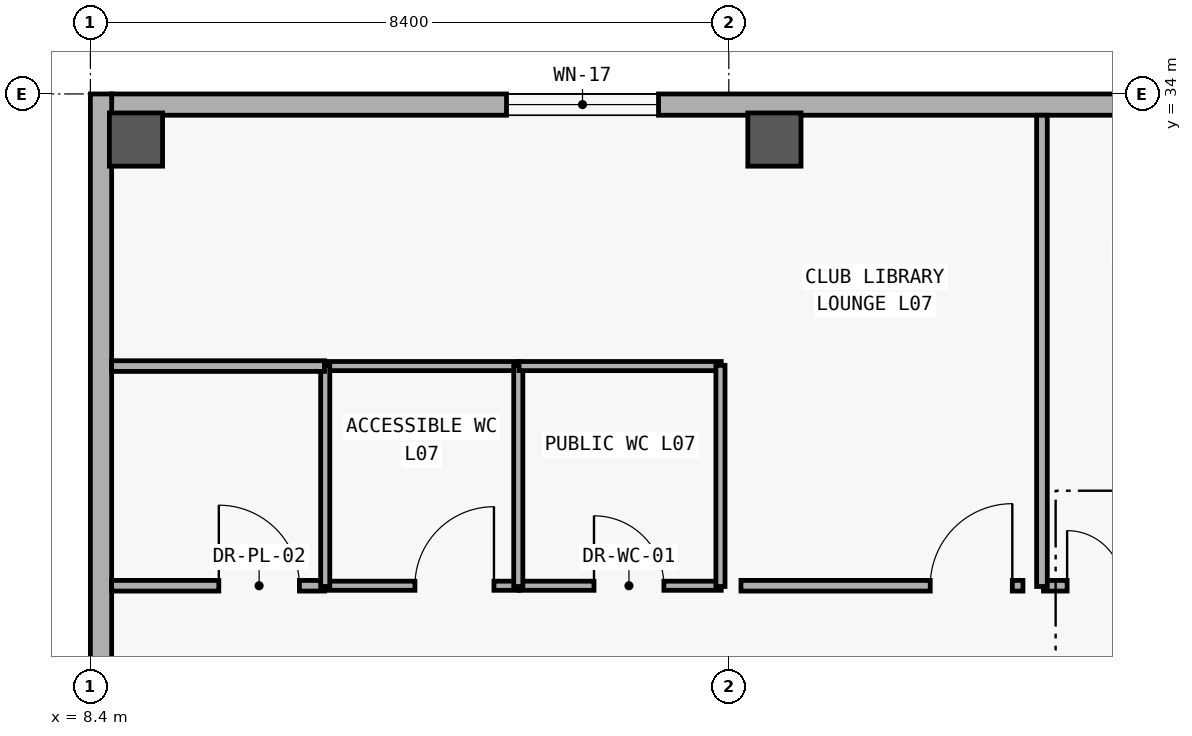
"""IFC4 building model, lengths in metres.
Left out: names, types, materials, properties, quantities, classifications, styles, units other than length and angle.
Written with IfcOpenShell. Run it as: python <this file> out.ifc"""

import sys

from ifc_helpers import new_model, si_unit, direction, frame, frame_2d, origin, origin_2d, place, context, subcontext, project, spatial, rectangle, extrude, element, fill, save


model = new_model("IFC4")
c1 = context("Model", 3, precision=1e-05, world=origin(), true_north=direction((0.0, 1.0)))
c2 = subcontext(c1, "Body", "Model", "MODEL_VIEW")
j1 = project(units=[si_unit("LENGTHUNIT", "METRE"), si_unit("PLANEANGLEUNIT", "RADIAN")], contexts=[c1])
p1 = place(None, origin())
s1 = spatial("IfcSite", under=j1, at=p1, CompositionType="ELEMENT")
p2 = place(p1, origin())
s2 = spatial("IfcBuilding", under=s1, at=p2, CompositionType="ELEMENT")
p3 = place(p2, frame((0.0, 0.0, 30.0)))
s3 = spatial("IfcBuildingStorey", under=s2, at=p3, CompositionType="ELEMENT", Elevation=30.0)
for number, where, z_axis, x_axis in (
    (1, (9.0, 33.4, 0.0), (0.0, 0.0, 1.0), (1.0, 0.0, 0.0)),
    (2, (17.4, 33.4, 0.0), (0.0, 0.0, 1.0), (1.0, 0.0, 0.0)),
):
    element("IfcColumn", number, at=place(p3, frame(where, z_axis=z_axis, x_axis=x_axis)), inside=s3, PredefinedType="COLUMN", context=c2, shape_type="SweptSolid", body=[
        extrude(rectangle(XDim=0.7, YDim=0.7, at=origin_2d()), origin(), (0.0, 0.0, 1.0), 3.6),
    ])
p4 = place(p3, frame((8.68, 33.86, 0.0), z_axis=(0.0, 0.0, 1.0), x_axis=(1.0, 0.0, 0.0)))
e3 = element("IfcWall", 3, at=p4, inside=s3, PredefinedType="SOLIDWALL", context=c2, shape_type="SweptSolid", body=[
    extrude(rectangle(XDim=66.64, YDim=0.28, at=frame_2d((33.32, 0.0))), origin(), (0.0, 0.0, 1.0), 3.34),
])
p5 = place(p4, frame((5.195, 0.0, 0.85)))
e4 = element("IfcOpeningElement", 4, at=p5, cuts=e3, PredefinedType="OPENING", context=c2, shape_type="SweptSolid", body=[
    extrude(rectangle(XDim=2.0, YDim=1.65, at=frame_2d((1.0, 0.825))), frame((0.0, 0.15, 0.0), z_axis=(0.0, -1.0, 0.0), x_axis=(1.0, 0.0, 0.0)), (0.0, 0.0, 1.0), 0.3),
])
p6 = place(p4, frame((13.209, 0.0, 0.85)))
e5 = element("IfcOpeningElement", 5, at=p6, cuts=e3, PredefinedType="OPENING", context=c2, shape_type="SweptSolid", body=[
    extrude(rectangle(XDim=2.25, YDim=1.75, at=frame_2d((1.125, 0.875))), frame((0.0, 0.15, 0.0), z_axis=(0.0, -1.0, 0.0), x_axis=(1.0, 0.0, 0.0)), (0.0, 0.0, 1.0), 0.3),
])
p7 = place(p4, frame((17.226, 0.0, 0.85)))
e6 = element("IfcOpeningElement", 6, at=p7, cuts=e3, PredefinedType="OPENING", context=c2, shape_type="SweptSolid", body=[
    extrude(rectangle(XDim=2.55, YDim=1.8, at=frame_2d((1.275, 0.9))), frame((0.0, 0.15, 0.0), z_axis=(0.0, -1.0, 0.0), x_axis=(1.0, 0.0, 0.0)), (0.0, 0.0, 1.0), 0.3),
])
p8 = place(p4, frame((21.242, 0.0, 0.85)))
e7 = element("IfcOpeningElement", 7, at=p8, cuts=e3, PredefinedType="OPENING", context=c2, shape_type="SweptSolid", body=[
    extrude(rectangle(XDim=2.85, YDim=1.85, at=frame_2d((1.425, 0.925))), frame((0.0, 0.15, 0.0), z_axis=(0.0, -1.0, 0.0), x_axis=(1.0, 0.0, 0.0)), (0.0, 0.0, 1.0), 0.3),
])
p9 = place(p4, frame((25.234, 0.0, 0.85)))
e8 = element("IfcOpeningElement", 8, at=p9, cuts=e3, PredefinedType="OPENING", context=c2, shape_type="SweptSolid", body=[
    extrude(rectangle(XDim=3.2, YDim=1.95, at=frame_2d((1.6, 0.975))), frame((0.0, 0.15, 0.0), z_axis=(0.0, -1.0, 0.0), x_axis=(1.0, 0.0, 0.0)), (0.0, 0.0, 1.0), 0.3),
])
p10 = place(p4, frame((30.302, 0.0, 0.85)))
e9 = element("IfcOpeningElement", 9, at=p10, cuts=e3, PredefinedType="OPENING", context=c2, shape_type="SweptSolid", body=[
    extrude(rectangle(XDim=1.4, YDim=1.6, at=frame_2d((0.7, 0.8))), frame((0.0, 0.15, 0.0), z_axis=(0.0, -1.0, 0.0), x_axis=(1.0, 0.0, 0.0)), (0.0, 0.0, 1.0), 0.3),
])
p11 = place(p4, frame((34.369, 0.0, 0.85)))
e10 = element("IfcOpeningElement", 10, at=p11, cuts=e3, PredefinedType="OPENING", context=c2, shape_type="SweptSolid", body=[
    extrude(rectangle(XDim=1.6, YDim=1.6, at=frame_2d((0.8, 0.8))), frame((0.0, 0.15, 0.0), z_axis=(0.0, -1.0, 0.0), x_axis=(1.0, 0.0, 0.0)), (0.0, 0.0, 1.0), 0.3),
])
p12 = place(p4, frame((38.435, 0.0, 0.85)))
e11 = element("IfcOpeningElement", 11, at=p12, cuts=e3, PredefinedType="OPENING", context=c2, shape_type="SweptSolid", body=[
    extrude(rectangle(XDim=1.8, YDim=1.6, at=frame_2d((0.9, 0.8))), frame((0.0, 0.15, 0.0), z_axis=(0.0, -1.0, 0.0), x_axis=(1.0, 0.0, 0.0)), (0.0, 0.0, 1.0), 0.3),
])
p13 = place(p4, frame((42.502, 0.0, 0.85)))
e12 = element("IfcOpeningElement", 12, at=p13, cuts=e3, PredefinedType="OPENING", context=c2, shape_type="SweptSolid", body=[
    extrude(rectangle(XDim=2.0, YDim=1.65, at=frame_2d((1.0, 0.825))), frame((0.0, 0.15, 0.0), z_axis=(0.0, -1.0, 0.0), x_axis=(1.0, 0.0, 0.0)), (0.0, 0.0, 1.0), 0.3),
])
p14 = place(p4, frame((46.569, 0.0, 0.85)))
e13 = element("IfcOpeningElement", 13, at=p14, cuts=e3, PredefinedType="OPENING", context=c2, shape_type="SweptSolid", body=[
    extrude(rectangle(XDim=2.2, YDim=1.65, at=frame_2d((1.1, 0.825))), frame((0.0, 0.15, 0.0), z_axis=(0.0, -1.0, 0.0), x_axis=(1.0, 0.0, 0.0)), (0.0, 0.0, 1.0), 0.3),
])
p15 = place(p4, frame((50.536, 0.0, 0.85)))
e14 = element("IfcOpeningElement", 14, at=p15, cuts=e3, PredefinedType="OPENING", context=c2, shape_type="SweptSolid", body=[
    extrude(rectangle(XDim=2.6, YDim=2.2, at=frame_2d((1.3, 1.1))), frame((0.0, 0.15, 0.0), z_axis=(0.0, -1.0, 0.0), x_axis=(1.0, 0.0, 0.0)), (0.0, 0.0, 1.0), 0.3),
])
p16 = place(p4, frame((54.453, 0.0, 0.85)))
e15 = element("IfcOpeningElement", 15, at=p16, cuts=e3, PredefinedType="OPENING", context=c2, shape_type="SweptSolid", body=[
    extrude(rectangle(XDim=3.1, YDim=2.2, at=frame_2d((1.55, 1.1))), frame((0.0, 0.15, 0.0), z_axis=(0.0, -1.0, 0.0), x_axis=(1.0, 0.0, 0.0)), (0.0, 0.0, 1.0), 0.3),
])
p17 = place(p4, frame((59.545, 0.0, 0.85)))
e16 = element("IfcOpeningElement", 16, at=p17, cuts=e3, PredefinedType="OPENING", context=c2, shape_type="SweptSolid", body=[
    extrude(rectangle(XDim=1.25, YDim=1.45, at=frame_2d((0.625, 0.725))), frame((0.0, 0.15, 0.0), z_axis=(0.0, -1.0, 0.0), x_axis=(1.0, 0.0, 0.0)), (0.0, 0.0, 1.0), 0.3),
])
p18 = place(p4, frame((63.662, 0.0, 0.85)))
e17 = element("IfcOpeningElement", 17, at=p18, cuts=e3, PredefinedType="OPENING", context=c2, shape_type="SweptSolid", body=[
    extrude(rectangle(XDim=1.35, YDim=1.55, at=frame_2d((0.675, 0.775))), frame((0.0, 0.15, 0.0), z_axis=(0.0, -1.0, 0.0), x_axis=(1.0, 0.0, 0.0)), (0.0, 0.0, 1.0), 0.3),
])
p19 = place(p3, frame((8.54, 8.8, 0.0), z_axis=(0.0, 0.0, 1.0), x_axis=(0.0, 1.0, 0.0)))
e18 = element("IfcWall", 18, at=p19, inside=s3, PredefinedType="SOLIDWALL", context=c2, shape_type="SweptSolid", body=[
    extrude(rectangle(XDim=25.2, YDim=0.28, at=frame_2d((12.6, 0.0))), origin(), (0.0, 0.0, 1.0), 3.34),
])
p20 = place(p19, frame((1.7, 0.0, 0.95)))
e19 = element("IfcOpeningElement", 19, at=p20, cuts=e18, PredefinedType="OPENING", context=c2, shape_type="SweptSolid", body=[
    extrude(rectangle(XDim=1.6, YDim=1.6, at=frame_2d((0.8, 0.8))), frame((0.0, 0.15, 0.0), z_axis=(0.0, -1.0, 0.0), x_axis=(1.0, 0.0, 0.0)), (0.0, 0.0, 1.0), 0.3),
])
p21 = place(p3, frame((11.48, 27.53, 0.0), z_axis=(0.0, 0.0, 1.0), x_axis=(1.0, 0.0, 0.0)))
e20 = element("IfcWall", 20, at=p21, inside=s3, PredefinedType="PARTITIONING", context=c2, shape_type="SweptSolid", body=[
    extrude(rectangle(XDim=2.56, YDim=0.12, at=frame_2d((1.28, 0.0))), origin(), (0.0, 0.0, 1.0), 2.48),
])
p22 = place(p21, frame((1.19, 0.0, 0.0)))
e21 = element("IfcOpeningElement", 21, at=p22, cuts=e20, PredefinedType="OPENING", context=c2, shape_type="SweptSolid", body=[
    extrude(rectangle(XDim=1.04, YDim=2.15, at=frame_2d((0.52, 1.075))), frame((0.0, 0.07, 0.0), z_axis=(0.0, -1.0, 0.0), x_axis=(1.0, 0.0, 0.0)), (0.0, 0.0, 1.0), 0.14),
])
p23 = place(p3, frame((14.04, 27.53, 0.0), z_axis=(0.0, 0.0, 1.0), x_axis=(1.0, 0.0, 0.0)))
e22 = element("IfcWall", 22, at=p23, inside=s3, PredefinedType="PARTITIONING", context=c2, shape_type="SweptSolid", body=[
    extrude(rectangle(XDim=2.66, YDim=0.12, at=frame_2d((1.33, 0.0))), origin(), (0.0, 0.0, 1.0), 2.48),
])
p24 = place(p23, frame((0.986, 0.0, 0.0)))
e23 = element("IfcOpeningElement", 23, at=p24, cuts=e22, PredefinedType="OPENING", context=c2, shape_type="SweptSolid", body=[
    extrude(rectangle(XDim=0.92, YDim=2.15, at=frame_2d((0.46, 1.075))), frame((0.0, 0.07, 0.0), z_axis=(0.0, -1.0, 0.0), x_axis=(1.0, 0.0, 0.0)), (0.0, 0.0, 1.0), 0.14),
])
p25 = place(p3, frame((8.68, 27.53, 0.0), z_axis=(0.0, 0.0, 1.0), x_axis=(1.0, 0.0, 0.0)))
e24 = element("IfcWall", 24, at=p25, inside=s3, PredefinedType="PARTITIONING", context=c2, shape_type="SweptSolid", body=[
    extrude(rectangle(XDim=2.8, YDim=0.14, at=frame_2d((1.4, 0.0))), origin(), (0.0, 0.0, 1.0), 2.48),
])
p26 = place(p25, frame((1.41, 0.0, 0.0)))
e25 = element("IfcOpeningElement", 25, at=p26, cuts=e24, PredefinedType="OPENING", context=c2, shape_type="SweptSolid", body=[
    extrude(rectangle(XDim=1.06, YDim=2.2, at=frame_2d((0.53, 1.1))), frame((0.0, 0.08, 0.0), z_axis=(0.0, -1.0, 0.0), x_axis=(1.0, 0.0, 0.0)), (0.0, 0.0, 1.0), 0.16),
])
p27 = place(p3, frame((16.96, 27.53, 0.0), z_axis=(0.0, 0.0, 1.0), x_axis=(1.0, 0.0, 0.0)))
e26 = element("IfcWall", 26, at=p27, inside=s3, PredefinedType="PARTITIONING", context=c2, shape_type="SweptSolid", body=[
    extrude(rectangle(XDim=3.71, YDim=0.14, at=frame_2d((1.855, 0.0))), origin(), (0.0, 0.0, 1.0), 2.48),
])
p28 = place(p27, frame((2.49, 0.0, 0.0)))
e27 = element("IfcOpeningElement", 27, at=p28, cuts=e26, PredefinedType="OPENING", context=c2, shape_type="SweptSolid", body=[
    extrude(rectangle(XDim=1.08, YDim=2.25, at=frame_2d((0.54, 1.125))), frame((0.0, 0.08, 0.0), z_axis=(0.0, -1.0, 0.0), x_axis=(1.0, 0.0, 0.0)), (0.0, 0.0, 1.0), 0.16),
])
p29 = place(p3, frame((20.94, 27.53, 0.0), z_axis=(0.0, 0.0, 1.0), x_axis=(1.0, 0.0, 0.0)))
e28 = element("IfcWall", 28, at=p29, inside=s3, PredefinedType="PARTITIONING", context=c2, shape_type="SweptSolid", body=[
    extrude(rectangle(XDim=2.685, YDim=0.14, at=frame_2d((1.343, 0.0))), origin(), (0.0, 0.0, 1.0), 2.48),
])
p30 = place(p29, frame((0.311, 0.0, 0.0)))
e29 = element("IfcOpeningElement", 29, at=p30, cuts=e28, PredefinedType="OPENING", context=c2, shape_type="SweptSolid", body=[
    extrude(rectangle(XDim=1.45, YDim=2.3, at=frame_2d((0.725, 1.15))), frame((0.0, 0.08, 0.0), z_axis=(0.0, -1.0, 0.0), x_axis=(1.0, 0.0, 0.0)), (0.0, 0.0, 1.0), 0.16),
])
p31 = place(p3, frame((11.48, 30.42, 0.0), z_axis=(0.0, 0.0, 1.0), x_axis=(1.0, 0.0, 0.0)))
e30 = element("IfcWall", 30, at=p31, inside=s3, PredefinedType="PARTITIONING", context=c2, shape_type="SweptSolid", body=[
    extrude(rectangle(XDim=2.56, YDim=0.12, at=frame_2d((1.28, 0.0))), origin(), (0.0, 0.0, 1.0), 2.48),
])
for number, where, z_axis, x_axis in (
    (31, (11.49, 27.52, 0.0), (0.0, 0.0, 1.0), (0.0, 1.0, 0.0)),
    (32, (14.03, 27.52, 0.0), (0.0, 0.0, 1.0), (0.0, 1.0, 0.0)),
):
    element("IfcWall", number, at=place(p3, frame(where, z_axis=z_axis, x_axis=x_axis)), inside=s3, PredefinedType="PARTITIONING", context=c2, shape_type="SweptSolid", body=[
        extrude(rectangle(XDim=2.91, YDim=0.12, at=frame_2d((1.455, 0.0))), origin(), (0.0, 0.0, 1.0), 2.48),
    ])
p32 = place(p3, frame((14.04, 30.42, 0.0), z_axis=(0.0, 0.0, 1.0), x_axis=(1.0, 0.0, 0.0)))
e33 = element("IfcWall", 33, at=p32, inside=s3, PredefinedType="PARTITIONING", context=c2, shape_type="SweptSolid", body=[
    extrude(rectangle(XDim=2.66, YDim=0.12, at=frame_2d((1.33, 0.0))), origin(), (0.0, 0.0, 1.0), 2.48),
])
p33 = place(p3, frame((16.69, 27.52, 0.0), z_axis=(0.0, 0.0, 1.0), x_axis=(0.0, 1.0, 0.0)))
e34 = element("IfcWall", 34, at=p33, inside=s3, PredefinedType="PARTITIONING", context=c2, shape_type="SweptSolid", body=[
    extrude(rectangle(XDim=2.91, YDim=0.12, at=frame_2d((1.455, 0.0))), origin(), (0.0, 0.0, 1.0), 2.48),
])
p34 = place(p3, frame((8.68, 30.42, 0.0), z_axis=(0.0, 0.0, 1.0), x_axis=(1.0, 0.0, 0.0)))
e35 = element("IfcWall", 35, at=p34, inside=s3, PredefinedType="PARTITIONING", context=c2, shape_type="SweptSolid", body=[
    extrude(rectangle(XDim=2.8, YDim=0.14, at=frame_2d((1.4, 0.0))), origin(), (0.0, 0.0, 1.0), 2.48),
])
p35 = place(p3, frame((20.92, 27.52, 0.0), z_axis=(0.0, 0.0, 1.0), x_axis=(0.0, 1.0, 0.0)))
e36 = element("IfcWall", 36, at=p35, inside=s3, PredefinedType="PARTITIONING", context=c2, shape_type="SweptSolid", body=[
    extrude(rectangle(XDim=6.2, YDim=0.14, at=frame_2d((3.1, 0.0))), origin(), (0.0, 0.0, 1.0), 2.48),
])
p36 = place(p5, origin())
e37 = element("IfcWindow", 37, at=p36, inside=s3, PartitioningType="SINGLE_PANEL", PredefinedType="WINDOW", context=c2, shape_type="SweptSolid", body=[
    extrude(rectangle(XDim=2.0, YDim=1.65, at=frame_2d((1.0, 0.825))), frame((0.0, 0.03, 0.0), z_axis=(0.0, -1.0, 0.0), x_axis=(1.0, 0.0, 0.0)), (0.0, 0.0, 1.0), 0.06),
])
fill(e4, e37)
p37 = place(p22, origin())
e38 = element("IfcDoor", 38, at=p37, inside=s3, OperationType="SINGLE_SWING_RIGHT", PredefinedType="DOOR", context=c2, shape_type="SweptSolid", body=[
    extrude(rectangle(XDim=1.04, YDim=2.15, at=frame_2d((0.52, 1.075))), frame((0.0, 0.025, 0.0), z_axis=(0.0, -1.0, 0.0), x_axis=(1.0, 0.0, 0.0)), (0.0, 0.0, 1.0), 0.05),
])
fill(e21, e38)
p38 = place(p24, origin())
e39 = element("IfcDoor", 39, at=p38, inside=s3, OperationType="SINGLE_SWING_LEFT", PredefinedType="DOOR", context=c2, shape_type="SweptSolid", body=[
    extrude(rectangle(XDim=0.92, YDim=2.15, at=frame_2d((0.46, 1.075))), frame((0.0, 0.025, 0.0), z_axis=(0.0, -1.0, 0.0), x_axis=(1.0, 0.0, 0.0)), (0.0, 0.0, 1.0), 0.05),
])
fill(e23, e39)
p39 = place(p26, origin())
e40 = element("IfcDoor", 40, at=p39, inside=s3, OperationType="SINGLE_SWING_LEFT", PredefinedType="DOOR", context=c2, shape_type="SweptSolid", body=[
    extrude(rectangle(XDim=1.06, YDim=2.2, at=frame_2d((0.53, 1.1))), frame((0.0, 0.025, 0.0), z_axis=(0.0, -1.0, 0.0), x_axis=(1.0, 0.0, 0.0)), (0.0, 0.0, 1.0), 0.05),
])
fill(e25, e40)
p40 = place(p28, origin())
e41 = element("IfcDoor", 41, at=p40, inside=s3, OperationType="SINGLE_SWING_RIGHT", PredefinedType="DOOR", context=c2, shape_type="SweptSolid", body=[
    extrude(rectangle(XDim=1.08, YDim=2.25, at=frame_2d((0.54, 1.125))), frame((0.0, 0.025, 0.0), z_axis=(0.0, -1.0, 0.0), x_axis=(1.0, 0.0, 0.0)), (0.0, 0.0, 1.0), 0.05),
])
fill(e27, e41)
p41 = place(p30, origin())
e42 = element("IfcDoor", 42, at=p41, inside=s3, OperationType="DOUBLE_DOOR_SINGLE_SWING", PredefinedType="DOOR", context=c2, shape_type="SweptSolid", body=[
    extrude(rectangle(XDim=1.45, YDim=2.3, at=frame_2d((0.725, 1.15))), frame((0.0, 0.025, 0.0), z_axis=(0.0, -1.0, 0.0), x_axis=(1.0, 0.0, 0.0)), (0.0, 0.0, 1.0), 0.05),
])
fill(e29, e42)
save(model, sys.argv[1])
